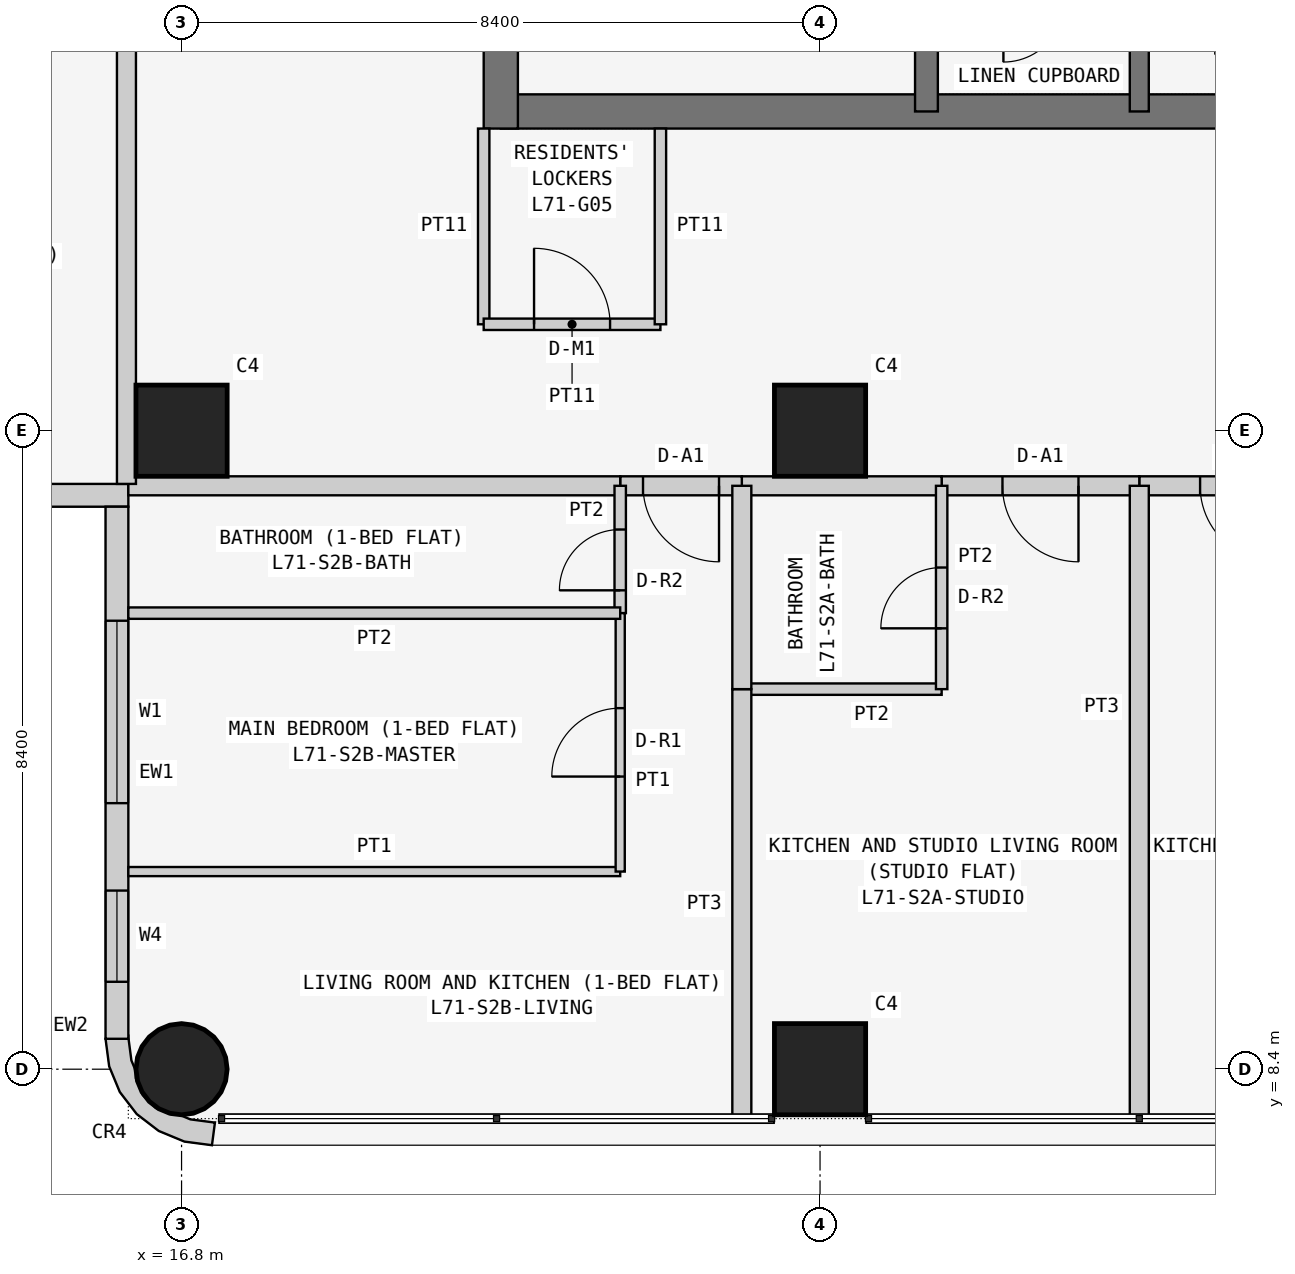
"""IFC4 building model, lengths in metres.
Left out: names, types, materials, properties, quantities, classifications, styles, units other than length and angle.
Written with IfcOpenShell. Run it as: python <this file> out.ifc"""

import sys

from ifc_helpers import new_model, si_unit, direction, frame, frame_2d, origin, origin_2d, place, context, subcontext, project, spatial, polyline, rectangle, circle, outline, extrude, element, fill, save


model = new_model("IFC4")
c1 = context("Model", 3, precision=1e-05, world=origin(), true_north=direction((0.0, 1.0)))
c2 = subcontext(c1, "Body", "Model", "MODEL_VIEW")
j1 = project(units=[si_unit("LENGTHUNIT", "METRE"), si_unit("PLANEANGLEUNIT", "RADIAN")], contexts=[c1])
p1 = place(None, origin())
s1 = spatial("IfcSite", under=j1, at=p1, CompositionType="ELEMENT")
p2 = place(p1, origin())
s2 = spatial("IfcBuilding", under=s1, at=p2, CompositionType="ELEMENT")
p3 = place(p2, frame((0.0, 0.0, 272.1)))
s3 = spatial("IfcBuildingStorey", under=s2, at=p3, CompositionType="ELEMENT", Elevation=272.1)
p4 = place(p3, frame((16.8, 8.4, 0.0), z_axis=(0.0, 0.0, 1.0), x_axis=(1.0, 0.0, 0.0)))
e1 = element("IfcColumn", 1, at=p4, inside=s3, PredefinedType="COLUMN", context=c2, shape_type="SweptSolid", body=[
    extrude(circle(Radius=0.6, at=origin_2d()), origin(), (0.0, 0.0, 1.0), 3.6),
])
for number, where, z_axis, x_axis in (
    (2, (16.8, 16.8, 0.0), (0.0, 0.0, 1.0), (1.0, 0.0, 0.0)),
    (3, (25.2, 8.4, 0.0), (0.0, 0.0, 1.0), (1.0, 0.0, 0.0)),
    (4, (25.2, 16.8, 0.0), (0.0, 0.0, 1.0), (1.0, 0.0, 0.0)),
):
    element("IfcColumn", number, at=place(p3, frame(where, z_axis=z_axis, x_axis=x_axis)), inside=s3, PredefinedType="COLUMN", context=c2, shape_type="SweptSolid", body=[
        extrude(rectangle(XDim=1.2, YDim=1.2, at=origin_2d()), origin(), (0.0, 0.0, 1.0), 3.6),
    ])
p5 = place(p3, frame((21.0, 21.0, 0.0), z_axis=(0.0, 0.0, 1.0), x_axis=(1.0, 0.0, 0.0)))
e5 = element("IfcWall", 5, at=p5, inside=s3, PredefinedType="SHEAR", context=c2, shape_type="SweptSolid", body=[
    extrude(rectangle(XDim=17.025, YDim=0.45, at=frame_2d((8.512, 0.0))), origin(), (0.0, 0.0, 1.0), 3.6),
])
p6 = place(p3, frame((21.0, 37.8, 0.0), z_axis=(0.0, 0.0, 1.0), x_axis=(0.0, -1.0, 0.0)))
e6 = element("IfcWall", 6, at=p6, inside=s3, PredefinedType="SHEAR", context=c2, shape_type="SweptSolid", body=[
    extrude(rectangle(XDim=17.025, YDim=0.45, at=frame_2d((8.513, 0.0))), origin(), (0.0, 0.0, 1.0), 3.6),
])
p7 = place(p6, frame((5.4, 0.0, 0.0)))
e7 = element("IfcOpeningElement", 7, at=p7, cuts=e6, PredefinedType="OPENING", context=c2, shape_type="SweptSolid", body=[
    extrude(rectangle(XDim=1.2, YDim=2.1, at=frame_2d((0.6, 1.05))), frame((0.0, 0.235, 0.0), z_axis=(0.0, -1.0, 0.0), x_axis=(1.0, 0.0, 0.0)), (0.0, 0.0, 1.0), 0.47),
])
p8 = place(p3, frame((26.6, 21.0, 0.0), z_axis=(0.0, 0.0, 1.0), x_axis=(0.0, 1.0, 0.0)))
e8 = element("IfcWall", 8, at=p8, inside=s3, PredefinedType="SHEAR", context=c2, shape_type="SweptSolid", body=[
    extrude(rectangle(XDim=16.8, YDim=0.3, at=frame_2d((8.4, 0.0))), origin(), (0.0, 0.0, 1.0), 3.6),
])
p9 = place(p8, frame((10.4, 0.0, 0.0)))
e9 = element("IfcOpeningElement", 9, at=p9, cuts=e8, PredefinedType="OPENING", context=c2, shape_type="SweptSolid", body=[
    extrude(rectangle(XDim=1.2, YDim=2.1, at=frame_2d((0.6, 1.05))), frame((0.0, 0.16, 0.0), z_axis=(0.0, -1.0, 0.0), x_axis=(1.0, 0.0, 0.0)), (0.0, 0.0, 1.0), 0.32),
])
p10 = place(p3, frame((29.4, 21.0, 0.0), z_axis=(0.0, 0.0, 1.0), x_axis=(0.0, 1.0, 0.0)))
e10 = element("IfcWall", 10, at=p10, inside=s3, PredefinedType="SHEAR", context=c2, shape_type="SweptSolid", body=[
    extrude(rectangle(XDim=3.2, YDim=0.25, at=frame_2d((1.6, 0.0))), origin(), (0.0, 0.0, 1.0), 3.6),
])
p11 = place(p3, frame((8.8, 15.95, 0.0), z_axis=(0.0, 0.0, 1.0), x_axis=(1.0, 0.0, 0.0)))
e11 = element("IfcWall", 11, at=p11, inside=s3, PredefinedType="SOLIDWALL", context=c2, shape_type="SweptSolid", body=[
    extrude(rectangle(XDim=7.3, YDim=0.3, at=frame_2d((3.65, 0.0))), origin(), (0.0, 0.0, 1.0), 3.45),
])
p12 = place(p11, frame((3.1, 0.0, 0.9)))
e12 = element("IfcOpeningElement", 12, at=p12, cuts=e11, PredefinedType="OPENING", context=c2, shape_type="SweptSolid", body=[
    extrude(rectangle(XDim=2.4, YDim=1.5, at=frame_2d((1.2, 0.75))), frame((0.0, 0.16, 0.0), z_axis=(0.0, -1.0, 0.0), x_axis=(1.0, 0.0, 0.0)), (0.0, 0.0, 1.0), 0.32),
])
p13 = place(p11, frame((0.75, 0.0, 0.9)))
e13 = element("IfcOpeningElement", 13, at=p13, cuts=e11, PredefinedType="OPENING", context=c2, shape_type="SweptSolid", body=[
    extrude(rectangle(XDim=1.2, YDim=1.5, at=frame_2d((0.6, 0.75))), frame((0.0, 0.16, 0.0), z_axis=(0.0, -1.0, 0.0), x_axis=(1.0, 0.0, 0.0)), (0.0, 0.0, 1.0), 0.32),
])
p14 = place(p3, frame((15.95, 15.8, 0.0), z_axis=(0.0, 0.0, 1.0), x_axis=(0.0, -1.0, 0.0)))
e14 = element("IfcWall", 14, at=p14, inside=s3, PredefinedType="SOLIDWALL", context=c2, shape_type="SweptSolid", body=[
    extrude(rectangle(XDim=7.0, YDim=0.3, at=frame_2d((3.5, 0.0))), origin(), (0.0, 0.0, 1.0), 3.45),
])
p15 = place(p14, frame((1.5, 0.0, 0.9)))
e15 = element("IfcOpeningElement", 15, at=p15, cuts=e14, PredefinedType="OPENING", context=c2, shape_type="SweptSolid", body=[
    extrude(rectangle(XDim=2.4, YDim=1.5, at=frame_2d((1.2, 0.75))), frame((0.0, 0.16, 0.0), z_axis=(0.0, -1.0, 0.0), x_axis=(1.0, 0.0, 0.0)), (0.0, 0.0, 1.0), 0.32),
])
p16 = place(p14, frame((5.05, 0.0, 0.9)))
e16 = element("IfcOpeningElement", 16, at=p16, cuts=e14, PredefinedType="OPENING", context=c2, shape_type="SweptSolid", body=[
    extrude(rectangle(XDim=1.2, YDim=1.5, at=frame_2d((0.6, 0.75))), frame((0.0, 0.16, 0.0), z_axis=(0.0, -1.0, 0.0), x_axis=(1.0, 0.0, 0.0)), (0.0, 0.0, 1.0), 0.32),
])
p17 = place(p3, frame((16.224, 8.762, 0.0), z_axis=(0.0, 0.0, 1.0), x_axis=(-0.707106781187, -0.707106781187, 0.0)))
e17 = element("IfcWall", 17, at=p17, inside=s3, PredefinedType="SOLIDWALL", context=c2, shape_type="SweptSolid", body=[
    extrude(outline(polyline([(0.033, 1.469), (0.047, 1.455), (0.233, 1.212), (0.292, 1.069), (0.358, 1.003), (0.449, 0.783), (0.449, 0.543), (0.358, 0.322), (0.292, 0.257), (0.233, 0.114), (0.047, -0.129), (0.033, -0.143), (0.273, -0.327), (0.495, -0.037), (0.635, 0.3), (0.683, 0.663), (0.635, 1.025), (0.495, 1.363), (0.273, 1.653), (0.033, 1.469)])), origin(), (0.0, 0.0, 1.0), 3.45),
])
p18 = place(p3, frame((20.775, 20.775, 0.0), z_axis=(0.0, 0.0, 1.0), x_axis=(0.0, -1.0, 0.0)))
e18 = element("IfcWall", 18, at=p18, inside=s3, PredefinedType="PARTITIONING", context=c2, shape_type="SweptSolid", body=[
    extrude(rectangle(XDim=2.575, YDim=0.15, at=frame_2d((1.288, 0.0))), origin(), (0.0, 0.0, 1.0), 3.45),
])
p19 = place(p3, frame((20.775, 18.2, 0.0), z_axis=(0.0, 0.0, 1.0), x_axis=(1.0, 0.0, 0.0)))
e19 = element("IfcWall", 19, at=p19, inside=s3, PredefinedType="PARTITIONING", context=c2, shape_type="SweptSolid", body=[
    extrude(rectangle(XDim=2.325, YDim=0.15, at=frame_2d((1.163, 0.0))), origin(), (0.0, 0.0, 1.0), 3.45),
])
p20 = place(p19, frame((0.663, 0.0, 0.0)))
e20 = element("IfcOpeningElement", 20, at=p20, cuts=e19, PredefinedType="OPENING", context=c2, shape_type="SweptSolid", body=[
    extrude(rectangle(XDim=1.0, YDim=2.1, at=frame_2d((0.5, 1.05))), frame((0.0, 0.085, 0.0), z_axis=(0.0, -1.0, 0.0), x_axis=(1.0, 0.0, 0.0)), (0.0, 0.0, 1.0), 0.17),
])
p21 = place(p3, frame((23.1, 18.2, 0.0), z_axis=(0.0, 0.0, 1.0), x_axis=(0.0, 1.0, 0.0)))
e21 = element("IfcWall", 21, at=p21, inside=s3, PredefinedType="PARTITIONING", context=c2, shape_type="SweptSolid", body=[
    extrude(rectangle(XDim=2.575, YDim=0.15, at=frame_2d((1.288, 0.0))), origin(), (0.0, 0.0, 1.0), 3.45),
])
p22 = place(p3, frame((32.0, 16.075, 0.0), z_axis=(0.0, 0.0, 1.0), x_axis=(-1.0, 0.0, 0.0)))
e22 = element("IfcWall", 22, at=p22, inside=s3, PredefinedType="PARTITIONING", context=c2, shape_type="SweptSolid", body=[
    extrude(rectangle(XDim=2.6, YDim=0.25, at=frame_2d((1.3, 0.0))), origin(), (0.0, 0.0, 1.0), 3.45),
])
p23 = place(p22, frame((0.8, 0.0, 0.0)))
e23 = element("IfcOpeningElement", 23, at=p23, cuts=e22, PredefinedType="OPENING", context=c2, shape_type="SweptSolid", body=[
    extrude(rectangle(XDim=1.0, YDim=2.1, at=frame_2d((0.5, 1.05))), frame((0.0, 0.135, 0.0), z_axis=(0.0, -1.0, 0.0), x_axis=(1.0, 0.0, 0.0)), (0.0, 0.0, 1.0), 0.27),
])
p24 = place(p3, frame((29.4, 16.075, 0.0), z_axis=(0.0, 0.0, 1.0), x_axis=(-1.0, 0.0, 0.0)))
e24 = element("IfcWall", 24, at=p24, inside=s3, PredefinedType="PARTITIONING", context=c2, shape_type="SweptSolid", body=[
    extrude(rectangle(XDim=2.6, YDim=0.25, at=frame_2d((1.3, 0.0))), origin(), (0.0, 0.0, 1.0), 3.45),
])
p25 = place(p24, frame((0.8, 0.0, 0.0)))
e25 = element("IfcOpeningElement", 25, at=p25, cuts=e24, PredefinedType="OPENING", context=c2, shape_type="SweptSolid", body=[
    extrude(rectangle(XDim=1.0, YDim=2.1, at=frame_2d((0.5, 1.05))), frame((0.0, 0.135, 0.0), z_axis=(0.0, -1.0, 0.0), x_axis=(1.0, 0.0, 0.0)), (0.0, 0.0, 1.0), 0.27),
])
p26 = place(p3, frame((26.8, 16.075, 0.0), z_axis=(0.0, 0.0, 1.0), x_axis=(-1.0, 0.0, 0.0)))
e26 = element("IfcWall", 26, at=p26, inside=s3, PredefinedType="PARTITIONING", context=c2, shape_type="SweptSolid", body=[
    extrude(rectangle(XDim=2.629, YDim=0.25, at=frame_2d((1.314, 0.0))), origin(), (0.0, 0.0, 1.0), 3.45),
])
p27 = place(p3, frame((24.171, 16.075, 0.0), z_axis=(0.0, 0.0, 1.0), x_axis=(-1.0, 0.0, 0.0)))
e27 = element("IfcWall", 27, at=p27, inside=s3, PredefinedType="PARTITIONING", context=c2, shape_type="SweptSolid", body=[
    extrude(rectangle(XDim=1.6, YDim=0.25, at=frame_2d((0.8, 0.0))), origin(), (0.0, 0.0, 1.0), 3.45),
])
p28 = place(p27, frame((0.3, 0.0, 0.0)))
e28 = element("IfcOpeningElement", 28, at=p28, cuts=e27, PredefinedType="OPENING", context=c2, shape_type="SweptSolid", body=[
    extrude(rectangle(XDim=1.0, YDim=2.1, at=frame_2d((0.5, 1.05))), frame((0.0, 0.135, 0.0), z_axis=(0.0, -1.0, 0.0), x_axis=(1.0, 0.0, 0.0)), (0.0, 0.0, 1.0), 0.27),
])
p29 = place(p3, frame((22.571, 16.075, 0.0), z_axis=(0.0, 0.0, 1.0), x_axis=(-1.0, 0.0, 0.0)))
e29 = element("IfcWall", 29, at=p29, inside=s3, PredefinedType="PARTITIONING", context=c2, shape_type="SweptSolid", body=[
    extrude(rectangle(XDim=6.471, YDim=0.25, at=frame_2d((3.235, 0.0))), origin(), (0.0, 0.0, 1.0), 3.45),
])
p30 = place(p3, frame((16.075, 16.1, 0.0), z_axis=(0.0, 0.0, 1.0), x_axis=(0.0, 1.0, 0.0)))
e30 = element("IfcWall", 30, at=p30, inside=s3, PredefinedType="PARTITIONING", context=c2, shape_type="SweptSolid", body=[
    extrude(rectangle(XDim=6.871, YDim=0.25, at=frame_2d((3.436, 0.0))), origin(), (0.0, 0.0, 1.0), 3.45),
])
p31 = place(p3, frame((29.4, 7.75, 0.0), z_axis=(0.0, 0.0, 1.0), x_axis=(0.0, 1.0, 0.0)))
e31 = element("IfcWall", 31, at=p31, inside=s3, PredefinedType="PARTITIONING", context=c2, shape_type="SweptSolid", body=[
    extrude(rectangle(XDim=8.325, YDim=0.25, at=frame_2d((4.163, 0.0))), origin(), (0.0, 0.0, 1.0), 2.848),
])
p32 = place(p3, frame((24.171, 13.4, 0.0), z_axis=(0.0, 0.0, 1.0), x_axis=(1.0, 0.0, 0.0)))
e32 = element("IfcWall", 32, at=p32, inside=s3, PredefinedType="PARTITIONING", context=c2, shape_type="SweptSolid", body=[
    extrude(rectangle(XDim=2.629, YDim=0.15, at=frame_2d((1.314, 0.0))), origin(), (0.0, 0.0, 1.0), 3.45),
])
p33 = place(p3, frame((26.8, 13.4, 0.0), z_axis=(0.0, 0.0, 1.0), x_axis=(0.0, 1.0, 0.0)))
e33 = element("IfcWall", 33, at=p33, inside=s3, PredefinedType="PARTITIONING", context=c2, shape_type="SweptSolid", body=[
    extrude(rectangle(XDim=2.675, YDim=0.15, at=frame_2d((1.337, 0.0))), origin(), (0.0, 0.0, 1.0), 3.45),
])
p34 = place(p33, frame((0.8, 0.0, 0.0)))
e34 = element("IfcOpeningElement", 34, at=p34, cuts=e33, PredefinedType="OPENING", context=c2, shape_type="SweptSolid", body=[
    extrude(rectangle(XDim=0.8, YDim=2.1, at=frame_2d((0.4, 1.05))), frame((0.0, 0.085, 0.0), z_axis=(0.0, -1.0, 0.0), x_axis=(1.0, 0.0, 0.0)), (0.0, 0.0, 1.0), 0.17),
])
p35 = place(p3, frame((24.171, 7.75, 0.0), z_axis=(0.0, 0.0, 1.0), x_axis=(0.0, 1.0, 0.0)))
e35 = element("IfcWall", 35, at=p35, inside=s3, PredefinedType="PARTITIONING", context=c2, shape_type="SweptSolid", body=[
    extrude(rectangle(XDim=5.65, YDim=0.25, at=frame_2d((2.825, 0.0))), origin(), (0.0, 0.0, 1.0), 3.45),
])
p36 = place(p3, frame((24.171, 13.4, 0.0), z_axis=(0.0, 0.0, 1.0), x_axis=(0.0, 1.0, 0.0)))
e36 = element("IfcWall", 36, at=p36, inside=s3, PredefinedType="PARTITIONING", context=c2, shape_type="SweptSolid", body=[
    extrude(rectangle(XDim=2.675, YDim=0.25, at=frame_2d((1.337, 0.0))), origin(), (0.0, 0.0, 1.0), 3.45),
])
p37 = place(p3, frame((22.571, 14.4, 0.0), z_axis=(0.0, 0.0, 1.0), x_axis=(0.0, 1.0, 0.0)))
e37 = element("IfcWall", 37, at=p37, inside=s3, PredefinedType="PARTITIONING", context=c2, shape_type="SweptSolid", body=[
    extrude(rectangle(XDim=1.675, YDim=0.15, at=frame_2d((0.837, 0.0))), origin(), (0.0, 0.0, 1.0), 3.45),
])
p38 = place(p37, frame((0.3, 0.0, 0.0)))
e38 = element("IfcOpeningElement", 38, at=p38, cuts=e37, PredefinedType="OPENING", context=c2, shape_type="SweptSolid", body=[
    extrude(rectangle(XDim=0.8, YDim=2.1, at=frame_2d((0.4, 1.05))), frame((0.0, 0.085, 0.0), z_axis=(0.0, -1.0, 0.0), x_axis=(1.0, 0.0, 0.0)), (0.0, 0.0, 1.0), 0.17),
])
p39 = place(p3, frame((16.1, 11.0, 0.0), z_axis=(0.0, 0.0, 1.0), x_axis=(1.0, 0.0, 0.0)))
e39 = element("IfcWall", 39, at=p39, inside=s3, PredefinedType="PARTITIONING", context=c2, shape_type="SweptSolid", body=[
    extrude(rectangle(XDim=6.471, YDim=0.12, at=frame_2d((3.235, 0.0))), origin(), (0.0, 0.0, 1.0), 3.45),
])
p40 = place(p3, frame((22.571, 11.0, 0.0), z_axis=(0.0, 0.0, 1.0), x_axis=(0.0, 1.0, 0.0)))
e40 = element("IfcWall", 40, at=p40, inside=s3, PredefinedType="PARTITIONING", context=c2, shape_type="SweptSolid", body=[
    extrude(rectangle(XDim=3.4, YDim=0.12, at=frame_2d((1.7, 0.0))), origin(), (0.0, 0.0, 1.0), 3.45),
])
p41 = place(p40, frame((1.25, 0.0, 0.0)))
e41 = element("IfcOpeningElement", 41, at=p41, cuts=e40, PredefinedType="OPENING", context=c2, shape_type="SweptSolid", body=[
    extrude(rectangle(XDim=0.9, YDim=2.1, at=frame_2d((0.45, 1.05))), frame((0.0, 0.07, 0.0), z_axis=(0.0, -1.0, 0.0), x_axis=(1.0, 0.0, 0.0)), (0.0, 0.0, 1.0), 0.14),
])
p42 = place(p3, frame((22.571, 14.4, 0.0), z_axis=(0.0, 0.0, 1.0), x_axis=(-1.0, 0.0, 0.0)))
e42 = element("IfcWall", 42, at=p42, inside=s3, PredefinedType="PARTITIONING", context=c2, shape_type="SweptSolid", body=[
    extrude(rectangle(XDim=6.471, YDim=0.15, at=frame_2d((3.235, 0.0))), origin(), (0.0, 0.0, 1.0), 3.45),
])
p43 = place(p15, origin())
e43 = element("IfcWindow", 43, at=p43, inside=s3, PartitioningType="SINGLE_PANEL", PredefinedType="WINDOW", context=c2, shape_type="SweptSolid", body=[
    extrude(rectangle(XDim=2.4, YDim=1.5, at=frame_2d((1.2, 0.75))), frame((0.0, 0.03, 0.0), z_axis=(0.0, -1.0, 0.0), x_axis=(1.0, 0.0, 0.0)), (0.0, 0.0, 1.0), 0.06),
])
fill(e15, e43)
p44 = place(p16, origin())
e44 = element("IfcWindow", 44, at=p44, inside=s3, PartitioningType="SINGLE_PANEL", PredefinedType="WINDOW", context=c2, shape_type="SweptSolid", body=[
    extrude(rectangle(XDim=1.2, YDim=1.5, at=frame_2d((0.6, 0.75))), frame((0.0, 0.03, 0.0), z_axis=(0.0, -1.0, 0.0), x_axis=(1.0, 0.0, 0.0)), (0.0, 0.0, 1.0), 0.06),
])
fill(e16, e44)
p45 = place(p20, origin())
e45 = element("IfcDoor", 45, at=p45, inside=s3, OperationType="SINGLE_SWING_LEFT", PredefinedType="DOOR", context=c2, shape_type="SweptSolid", body=[
    extrude(rectangle(XDim=1.0, YDim=2.1, at=frame_2d((0.5, 1.05))), frame((0.0, 0.025, 0.0), z_axis=(0.0, -1.0, 0.0), x_axis=(1.0, 0.0, 0.0)), (0.0, 0.0, 1.0), 0.05),
])
fill(e20, e45)
p46 = place(p23, origin())
e46 = element("IfcDoor", 46, at=p46, inside=s3, OperationType="SINGLE_SWING_LEFT", PredefinedType="DOOR", context=c2, shape_type="SweptSolid", body=[
    extrude(rectangle(XDim=1.0, YDim=2.1, at=frame_2d((0.5, 1.05))), frame((0.0, 0.025, 0.0), z_axis=(0.0, -1.0, 0.0), x_axis=(1.0, 0.0, 0.0)), (0.0, 0.0, 1.0), 0.05),
])
fill(e23, e46)
p47 = place(p25, origin())
e47 = element("IfcDoor", 47, at=p47, inside=s3, OperationType="SINGLE_SWING_LEFT", PredefinedType="DOOR", context=c2, shape_type="SweptSolid", body=[
    extrude(rectangle(XDim=1.0, YDim=2.1, at=frame_2d((0.5, 1.05))), frame((0.0, 0.025, 0.0), z_axis=(0.0, -1.0, 0.0), x_axis=(1.0, 0.0, 0.0)), (0.0, 0.0, 1.0), 0.05),
])
fill(e25, e47)
p48 = place(p34, origin())
e48 = element("IfcDoor", 48, at=p48, inside=s3, OperationType="SINGLE_SWING_LEFT", PredefinedType="DOOR", context=c2, shape_type="SweptSolid", body=[
    extrude(rectangle(XDim=0.8, YDim=2.1, at=frame_2d((0.4, 1.05))), frame((0.0, 0.025, 0.0), z_axis=(0.0, -1.0, 0.0), x_axis=(1.0, 0.0, 0.0)), (0.0, 0.0, 1.0), 0.05),
])
fill(e34, e48)
p49 = place(p28, origin())
e49 = element("IfcDoor", 49, at=p49, inside=s3, OperationType="SINGLE_SWING_LEFT", PredefinedType="DOOR", context=c2, shape_type="SweptSolid", body=[
    extrude(rectangle(XDim=1.0, YDim=2.1, at=frame_2d((0.5, 1.05))), frame((0.0, 0.025, 0.0), z_axis=(0.0, -1.0, 0.0), x_axis=(1.0, 0.0, 0.0)), (0.0, 0.0, 1.0), 0.05),
])
fill(e28, e49)
p50 = place(p38, origin())
e50 = element("IfcDoor", 50, at=p50, inside=s3, OperationType="SINGLE_SWING_LEFT", PredefinedType="DOOR", context=c2, shape_type="SweptSolid", body=[
    extrude(rectangle(XDim=0.8, YDim=2.1, at=frame_2d((0.4, 1.05))), frame((0.0, 0.025, 0.0), z_axis=(0.0, -1.0, 0.0), x_axis=(1.0, 0.0, 0.0)), (0.0, 0.0, 1.0), 0.05),
])
fill(e38, e50)
p51 = place(p41, origin())
e51 = element("IfcDoor", 51, at=p51, inside=s3, OperationType="SINGLE_SWING_LEFT", PredefinedType="DOOR", context=c2, shape_type="SweptSolid", body=[
    extrude(rectangle(XDim=0.9, YDim=2.1, at=frame_2d((0.45, 1.05))), frame((0.0, 0.025, 0.0), z_axis=(0.0, -1.0, 0.0), x_axis=(1.0, 0.0, 0.0)), (0.0, 0.0, 1.0), 0.05),
])
fill(e41, e51)
save(model, sys.argv[1])
